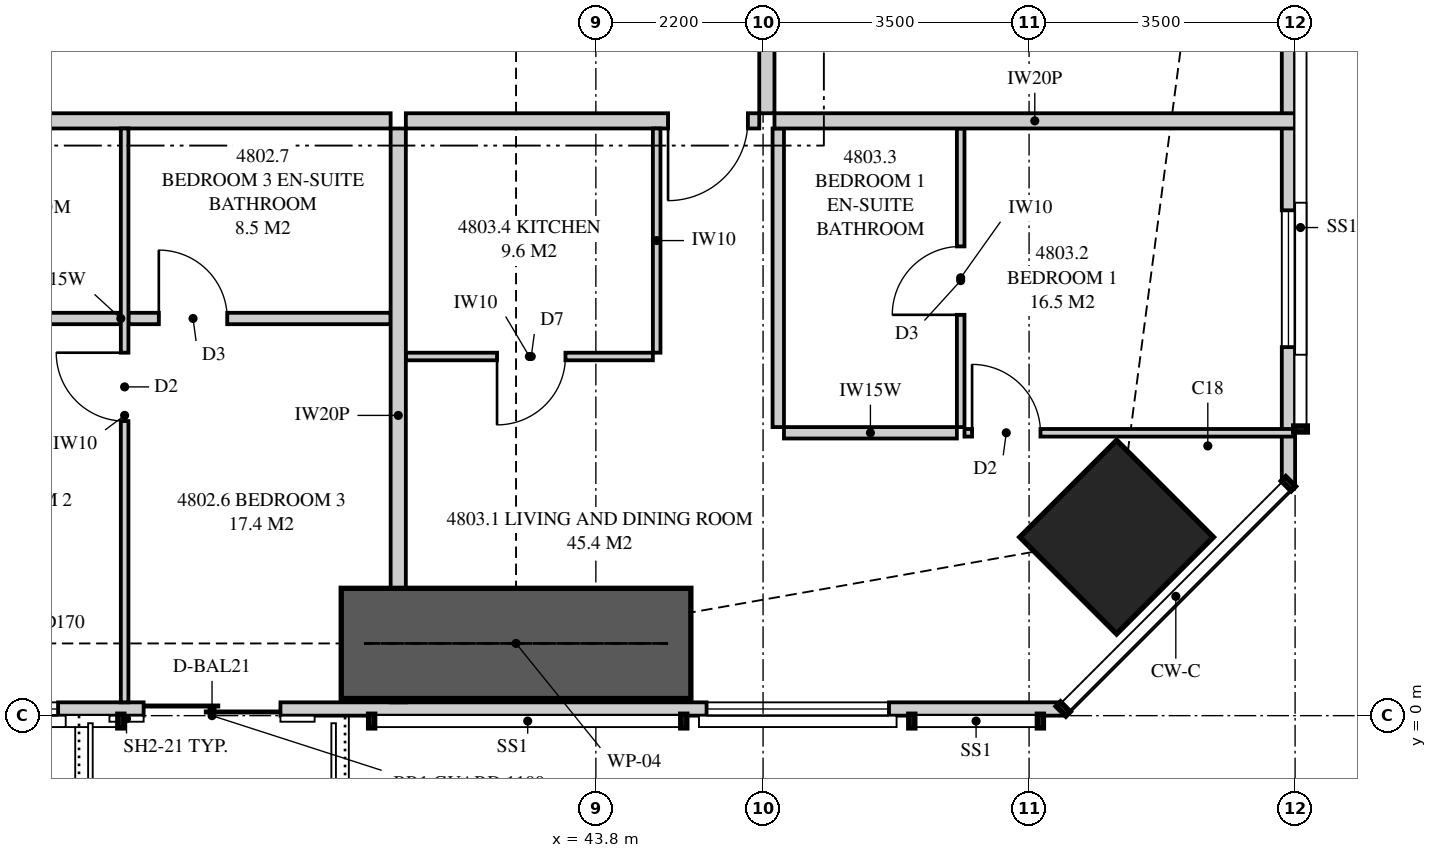
"""IFC4 building model, lengths in metres.
Left out: names, types, materials, properties, quantities, classifications, styles, units other than length and angle.
Written with IfcOpenShell. Run it as: python <this file> out.ifc"""

import sys

from ifc_helpers import new_model, si_unit, direction, frame, frame_2d, origin, origin_2d, place, context, subcontext, project, spatial, polyline, rectangle, outline, extrude, element, fill, save


model = new_model("IFC4")
c1 = context("Model", 3, precision=1e-05, world=origin(), true_north=direction((0.0, 1.0)))
c2 = subcontext(c1, "Body", "Model", "MODEL_VIEW")
j1 = project(units=[si_unit("LENGTHUNIT", "METRE"), si_unit("PLANEANGLEUNIT", "RADIAN")], contexts=[c1])
p1 = place(None, origin())
s1 = spatial("IfcSite", under=j1, at=p1, CompositionType="ELEMENT")
p2 = place(p1, origin())
s2 = spatial("IfcBuilding", under=s1, at=p2, CompositionType="ELEMENT")
p3 = place(p2, frame((0.0, 0.0, 177.8)))
s3 = spatial("IfcBuildingStorey", under=s2, at=p3, CompositionType="ELEMENT", Elevation=177.8)
p4 = place(p3, frame((50.652, 2.348, 0.0), z_axis=(0.0, 0.0, 1.0), x_axis=(0.707106781187, 0.707106781187, 0.0)))
e1 = element("IfcColumn", 1, at=p4, inside=s3, PredefinedType="COLUMN", context=c2, shape_type="SweptSolid", body=[
    extrude(rectangle(XDim=1.8, YDim=1.8, at=origin_2d()), origin(), (0.0, 0.0, 1.0), 3.35),
])
p5 = place(p3, frame((15.051, 0.087, 0.0), z_axis=(0.0, 0.0, 1.0), x_axis=(1.0, 0.0, 0.0)))
e2 = element("IfcWall", 2, at=p5, inside=s3, PredefinedType="SOLIDWALL", context=c2, shape_type="SweptSolid", body=[
    extrude(outline(polyline([(0.0, 0.0), (34.897, 0.0), (34.897, 3.11), (27.91, 3.11), (27.91, 2.15), (27.836, 2.15), (27.836, 3.11), (27.699, 3.11), (27.699, 2.15), (7.199, 2.15), (7.199, 3.11), (7.062, 3.11), (7.062, 2.15), (6.987, 2.15), (6.987, 3.11), (0.0, 3.11), (0.0, 0.0)])), frame((0.0, 0.087, 0.0), z_axis=(0.0, -1.0, 0.0), x_axis=(1.0, 0.0, 0.0)), (0.0, 0.0, 1.0), 0.175),
])
p6 = place(p5, frame((2.31, 0.0, 0.4)))
e3 = element("IfcOpeningElement", 3, at=p6, cuts=e2, PredefinedType="OPENING", context=c2, shape_type="SweptSolid", body=[
    extrude(rectangle(XDim=2.4, YDim=1.7, at=frame_2d((1.2, 0.85))), frame((0.0, 0.097, 0.0), z_axis=(0.0, -1.0, 0.0), x_axis=(1.0, 0.0, 0.0)), (0.0, 0.0, 1.0), 0.195),
])
p7 = place(p5, frame((10.399, 0.0, 0.0)))
e4 = element("IfcOpeningElement", 4, at=p7, cuts=e2, PredefinedType="OPENING", context=c2, shape_type="SweptSolid", body=[
    extrude(rectangle(XDim=1.8, YDim=2.1, at=frame_2d((0.9, 1.05))), frame((0.0, 0.097, 0.0), z_axis=(0.0, -1.0, 0.0), x_axis=(1.0, 0.0, 0.0)), (0.0, 0.0, 1.0), 0.195),
])
p8 = place(p5, frame((12.649, 0.0, 0.4)))
e5 = element("IfcOpeningElement", 5, at=p8, cuts=e2, PredefinedType="OPENING", context=c2, shape_type="SweptSolid", body=[
    extrude(rectangle(XDim=2.4, YDim=1.7, at=frame_2d((1.2, 0.85))), frame((0.0, 0.097, 0.0), z_axis=(0.0, -1.0, 0.0), x_axis=(1.0, 0.0, 0.0)), (0.0, 0.0, 1.0), 0.195),
])
p9 = place(p5, frame((19.874, 0.0, 0.4)))
e6 = element("IfcOpeningElement", 6, at=p9, cuts=e2, PredefinedType="OPENING", context=c2, shape_type="SweptSolid", body=[
    extrude(rectangle(XDim=1.8, YDim=1.7, at=frame_2d((0.9, 0.85))), frame((0.0, 0.097, 0.0), z_axis=(0.0, -1.0, 0.0), x_axis=(1.0, 0.0, 0.0)), (0.0, 0.0, 1.0), 0.195),
])
p10 = place(p5, frame((22.799, 0.0, 0.0)))
e7 = element("IfcOpeningElement", 7, at=p10, cuts=e2, PredefinedType="OPENING", context=c2, shape_type="SweptSolid", body=[
    extrude(rectangle(XDim=1.8, YDim=2.1, at=frame_2d((0.9, 1.05))), frame((0.0, 0.097, 0.0), z_axis=(0.0, -1.0, 0.0), x_axis=(1.0, 0.0, 0.0)), (0.0, 0.0, 1.0), 0.195),
])
p11 = place(p5, frame((30.205, 0.0, 0.4)))
e8 = element("IfcOpeningElement", 8, at=p11, cuts=e2, PredefinedType="OPENING", context=c2, shape_type="SweptSolid", body=[
    extrude(rectangle(XDim=2.4, YDim=1.7, at=frame_2d((1.2, 0.85))), frame((0.0, 0.097, 0.0), z_axis=(0.0, -1.0, 0.0), x_axis=(1.0, 0.0, 0.0)), (0.0, 0.0, 1.0), 0.195),
])
p12 = place(p3, frame((52.913, 3.051, 0.0), z_axis=(0.0, 0.0, 1.0), x_axis=(0.0, 1.0, 0.0)))
e9 = element("IfcWall", 9, at=p12, inside=s3, PredefinedType="SOLIDWALL", context=c2, shape_type="SweptSolid", body=[
    extrude(outline(polyline([(0.0, 0.0), (29.897, 0.0), (29.897, 3.11), (22.167, 3.11), (22.167, 2.15), (22.074, 2.15), (22.074, 3.11), (21.949, 3.11), (21.949, 2.15), (9.949, 2.15), (9.949, 3.11), (9.847, 3.11), (9.847, 2.15), (9.706, 2.15), (9.706, 3.11), (0.0, 3.11), (0.0, 0.0)])), frame((0.0, 0.087, 0.0), z_axis=(0.0, -1.0, 0.0), x_axis=(1.0, 0.0, 0.0)), (0.0, 0.0, 1.0), 0.175),
])
p13 = place(p12, frame((1.797, 0.0, 0.4)))
e10 = element("IfcOpeningElement", 10, at=p13, cuts=e9, PredefinedType="OPENING", context=c2, shape_type="SweptSolid", body=[
    extrude(rectangle(XDim=1.8, YDim=1.7, at=frame_2d((0.9, 0.85))), frame((0.0, 0.097, 0.0), z_axis=(0.0, -1.0, 0.0), x_axis=(1.0, 0.0, 0.0)), (0.0, 0.0, 1.0), 0.195),
])
p14 = place(p12, frame((6.321, 0.0, 0.4)))
e11 = element("IfcOpeningElement", 11, at=p14, cuts=e9, PredefinedType="OPENING", context=c2, shape_type="SweptSolid", body=[
    extrude(rectangle(XDim=1.2, YDim=1.7, at=frame_2d((0.6, 0.85))), frame((0.0, 0.097, 0.0), z_axis=(0.0, -1.0, 0.0), x_axis=(1.0, 0.0, 0.0)), (0.0, 0.0, 1.0), 0.195),
])
p15 = place(p12, frame((12.424, 0.0, 0.4)))
e12 = element("IfcOpeningElement", 12, at=p15, cuts=e9, PredefinedType="OPENING", context=c2, shape_type="SweptSolid", body=[
    extrude(rectangle(XDim=1.8, YDim=1.7, at=frame_2d((0.9, 0.85))), frame((0.0, 0.097, 0.0), z_axis=(0.0, -1.0, 0.0), x_axis=(1.0, 0.0, 0.0)), (0.0, 0.0, 1.0), 0.195),
])
p16 = place(p12, frame((15.274, 0.0, 0.0)))
e13 = element("IfcOpeningElement", 13, at=p16, cuts=e9, PredefinedType="OPENING", context=c2, shape_type="SweptSolid", body=[
    extrude(rectangle(XDim=1.8, YDim=2.1, at=frame_2d((0.9, 1.05))), frame((0.0, 0.097, 0.0), z_axis=(0.0, -1.0, 0.0), x_axis=(1.0, 0.0, 0.0)), (0.0, 0.0, 1.0), 0.195),
])
p17 = place(p12, frame((17.736, 0.0, 0.4)))
e14 = element("IfcOpeningElement", 14, at=p17, cuts=e9, PredefinedType="OPENING", context=c2, shape_type="SweptSolid", body=[
    extrude(rectangle(XDim=1.8, YDim=1.7, at=frame_2d((0.9, 0.85))), frame((0.0, 0.097, 0.0), z_axis=(0.0, -1.0, 0.0), x_axis=(1.0, 0.0, 0.0)), (0.0, 0.0, 1.0), 0.195),
])
p18 = place(p12, frame((24.373, 0.0, 0.4)))
e15 = element("IfcOpeningElement", 15, at=p18, cuts=e9, PredefinedType="OPENING", context=c2, shape_type="SweptSolid", body=[
    extrude(rectangle(XDim=1.2, YDim=1.7, at=frame_2d((0.6, 0.85))), frame((0.0, 0.097, 0.0), z_axis=(0.0, -1.0, 0.0), x_axis=(1.0, 0.0, 0.0)), (0.0, 0.0, 1.0), 0.195),
])
p19 = place(p12, frame((26.861, 0.0, 0.4)))
e16 = element("IfcOpeningElement", 16, at=p19, cuts=e9, PredefinedType="OPENING", context=c2, shape_type="SweptSolid", body=[
    extrude(rectangle(XDim=2.4, YDim=1.7, at=frame_2d((1.2, 0.85))), frame((0.0, 0.097, 0.0), z_axis=(0.0, -1.0, 0.0), x_axis=(1.0, 0.0, 0.0)), (0.0, 0.0, 1.0), 0.195),
])
p20 = place(p3, frame((41.2, 0.175, 0.0), z_axis=(0.0, 0.0, 1.0), x_axis=(0.0, 1.0, 0.0)))
e17 = element("IfcWall", 17, at=p20, inside=s3, PredefinedType="PARTITIONING", context=c2, shape_type="SweptSolid", body=[
    extrude(outline(polyline([(0.529, 2.15), (0.0, 2.15), (0.0, 0.0), (0.529, 0.0), (0.529, 0.248), (1.021, 0.248), (1.021, 0.0), (7.55, 0.0), (7.55, 3.11), (1.685, 3.11), (1.685, 2.15), (1.021, 2.15), (1.021, 1.902), (0.529, 1.902), (0.529, 2.15)])), frame((0.0, 0.1, 0.0), z_axis=(0.0, -1.0, 0.0), x_axis=(1.0, 0.0, 0.0)), (0.0, 0.0, 1.0), 0.2),
])
p21 = place(p3, frame((37.6, 0.175, 0.0), z_axis=(0.0, 0.0, 1.0), x_axis=(0.0, 1.0, 0.0)))
e18 = element("IfcWall", 18, at=p21, inside=s3, PredefinedType="PARTITIONING", context=c2, shape_type="SweptSolid", body=[
    extrude(outline(polyline([(0.0, 0.0), (7.55, 0.0), (7.55, 3.11), (1.635, 3.11), (1.635, 2.15), (0.0, 2.15), (0.0, 3.11), (0.0, 0.0)])), frame((0.0, 0.05, 0.0), z_axis=(0.0, -1.0, 0.0), x_axis=(1.0, 0.0, 0.0)), (0.0, 0.0, 1.0), 0.1),
])
p22 = place(p21, frame((3.7, 0.0, 0.0)))
e19 = element("IfcOpeningElement", 19, at=p22, cuts=e18, PredefinedType="OPENING", context=c2, shape_type="SweptSolid", body=[
    extrude(rectangle(XDim=0.9, YDim=2.1, at=frame_2d((0.45, 1.05))), frame((0.0, 0.06, 0.0), z_axis=(0.0, -1.0, 0.0), x_axis=(1.0, 0.0, 0.0)), (0.0, 0.0, 1.0), 0.12),
])
p23 = place(p3, frame((34.05, 5.225, 0.0), z_axis=(0.0, 0.0, 1.0), x_axis=(1.0, 0.0, 0.0)))
e20 = element("IfcWall", 20, at=p23, inside=s3, PredefinedType="PLUMBINGWALL", context=c2, shape_type="SweptSolid", body=[
    extrude(rectangle(XDim=3.5, YDim=0.15, at=frame_2d((1.75, 0.0))), origin(), (0.0, 0.0, 1.0), 3.11),
])
p24 = place(p3, frame((37.65, 5.225, 0.0), z_axis=(0.0, 0.0, 1.0), x_axis=(1.0, 0.0, 0.0)))
e21 = element("IfcWall", 21, at=p24, inside=s3, PredefinedType="PLUMBINGWALL", context=c2, shape_type="SweptSolid", body=[
    extrude(rectangle(XDim=3.45, YDim=0.15, at=frame_2d((1.725, 0.0))), origin(), (0.0, 0.0, 1.0), 3.11),
])
p25 = place(p24, frame((0.4, 0.0, 0.0)))
e22 = element("IfcOpeningElement", 22, at=p25, cuts=e21, PredefinedType="OPENING", context=c2, shape_type="SweptSolid", body=[
    extrude(rectangle(XDim=0.9, YDim=2.1, at=frame_2d((0.45, 1.05))), frame((0.0, 0.085, 0.0), z_axis=(0.0, -1.0, 0.0), x_axis=(1.0, 0.0, 0.0)), (0.0, 0.0, 1.0), 0.17),
])
p26 = place(p3, frame((41.3, 7.825, 0.0), z_axis=(0.0, 0.0, 1.0), x_axis=(1.0, 0.0, 0.0)))
e23 = element("IfcWall", 23, at=p26, inside=s3, PredefinedType="PARTITIONING", context=c2, shape_type="SweptSolid", body=[
    extrude(outline(polyline([(0.0, 0.0), (4.65, 0.0), (4.65, 3.11), (1.787, 3.11), (1.787, 2.541), (1.113, 2.541), (1.113, 3.11), (0.0, 3.11), (0.0, 0.0)])), frame((0.0, 0.1, 0.0), z_axis=(0.0, -1.0, 0.0), x_axis=(1.0, 0.0, 0.0)), (0.0, 0.0, 1.0), 0.2),
])
p27 = place(p26, frame((3.45, 0.0, 0.0)))
e24 = element("IfcOpeningElement", 24, at=p27, cuts=e23, PredefinedType="OPENING", context=c2, shape_type="SweptSolid", body=[
    extrude(rectangle(XDim=1.05, YDim=2.2, at=frame_2d((0.525, 1.1))), frame((0.0, 0.11, 0.0), z_axis=(0.0, -1.0, 0.0), x_axis=(1.0, 0.0, 0.0)), (0.0, 0.0, 1.0), 0.22),
])
p28 = place(p3, frame((48.6, 3.796, 0.0), z_axis=(0.0, 0.0, 1.0), x_axis=(0.0, 1.0, 0.0)))
e25 = element("IfcWall", 25, at=p28, inside=s3, PredefinedType="PARTITIONING", context=c2, shape_type="SweptSolid", body=[
    extrude(rectangle(XDim=3.929, YDim=0.1, at=frame_2d((1.964, 0.0))), origin(), (0.0, 0.0, 1.0), 3.11),
])
p29 = place(p28, frame((1.477, 0.0, 0.0)))
e26 = element("IfcOpeningElement", 26, at=p29, cuts=e25, PredefinedType="OPENING", context=c2, shape_type="SweptSolid", body=[
    extrude(rectangle(XDim=0.9, YDim=2.1, at=frame_2d((0.45, 1.05))), frame((0.0, 0.06, 0.0), z_axis=(0.0, -1.0, 0.0), x_axis=(1.0, 0.0, 0.0)), (0.0, 0.0, 1.0), 0.12),
])
p30 = place(p3, frame((48.65, 3.721, 0.0), z_axis=(0.0, 0.0, 1.0), x_axis=(1.0, 0.0, 0.0)))
e27 = element("IfcWall", 27, at=p30, inside=s3, PredefinedType="PARTITIONING", context=c2, shape_type="SweptSolid", body=[
    extrude(outline(polyline([(0.0, 0.0), (4.35, 0.0), (4.35, 3.11), (3.049, 3.11), (3.049, 2.15), (1.314, 2.15), (1.314, 3.11), (0.0, 3.11), (0.0, 0.0)])), frame((0.0, 0.05, 0.0), z_axis=(0.0, -1.0, 0.0), x_axis=(1.0, 0.0, 0.0)), (0.0, 0.0, 1.0), 0.1),
])
p31 = place(p30, frame((0.1, 0.0, 0.0)))
e28 = element("IfcOpeningElement", 28, at=p31, cuts=e27, PredefinedType="OPENING", context=c2, shape_type="SweptSolid", body=[
    extrude(rectangle(XDim=0.9, YDim=2.1, at=frame_2d((0.45, 1.05))), frame((0.0, 0.06, 0.0), z_axis=(0.0, -1.0, 0.0), x_axis=(1.0, 0.0, 0.0)), (0.0, 0.0, 1.0), 0.12),
])
p32 = place(p3, frame((46.275, 3.721, 0.0), z_axis=(0.0, 0.0, 1.0), x_axis=(1.0, 0.0, 0.0)))
e29 = element("IfcWall", 29, at=p32, inside=s3, PredefinedType="PLUMBINGWALL", context=c2, shape_type="SweptSolid", body=[
    extrude(rectangle(XDim=2.275, YDim=0.15, at=frame_2d((1.138, 0.0))), origin(), (0.0, 0.0, 1.0), 3.11),
])
p33 = place(p3, frame((46.2, 3.796, 0.0), z_axis=(0.0, 0.0, 1.0), x_axis=(0.0, 1.0, 0.0)))
e30 = element("IfcWall", 30, at=p33, inside=s3, PredefinedType="PLUMBINGWALL", context=c2, shape_type="SweptSolid", body=[
    extrude(rectangle(XDim=3.929, YDim=0.15, at=frame_2d((1.964, 0.0))), origin(), (0.0, 0.0, 1.0), 3.11),
])
p34 = place(p3, frame((41.3, 4.725, 0.0), z_axis=(0.0, 0.0, 1.0), x_axis=(1.0, 0.0, 0.0)))
e31 = element("IfcWall", 31, at=p34, inside=s3, PredefinedType="PARTITIONING", context=c2, shape_type="SweptSolid", body=[
    extrude(outline(polyline([(0.0, 0.0), (3.25, 0.0), (3.25, 3.11), (1.737, 3.11), (1.737, 2.541), (1.163, 2.541), (1.163, 3.11), (0.0, 3.11), (0.0, 0.0)])), frame((0.0, 0.05, 0.0), z_axis=(0.0, -1.0, 0.0), x_axis=(1.0, 0.0, 0.0)), (0.0, 0.0, 1.0), 0.1),
])
p35 = place(p34, frame((1.2, 0.0, 0.0)))
e32 = element("IfcOpeningElement", 32, at=p35, cuts=e31, PredefinedType="OPENING", context=c2, shape_type="SweptSolid", body=[
    extrude(rectangle(XDim=0.9, YDim=2.1, at=frame_2d((0.45, 1.05))), frame((0.0, 0.06, 0.0), z_axis=(0.0, -1.0, 0.0), x_axis=(1.0, 0.0, 0.0)), (0.0, 0.0, 1.0), 0.12),
])
p36 = place(p3, frame((44.6, 4.775, 0.0), z_axis=(0.0, 0.0, 1.0), x_axis=(0.0, 1.0, 0.0)))
e33 = element("IfcWall", 33, at=p36, inside=s3, PredefinedType="PARTITIONING", context=c2, shape_type="SweptSolid", body=[
    extrude(rectangle(XDim=2.95, YDim=0.1, at=frame_2d((1.475, 0.0))), origin(), (0.0, 0.0, 1.0), 3.11),
])
p37 = place(p3, frame((46.15, 7.825, 0.0), z_axis=(0.0, 0.0, 1.0), x_axis=(1.0, 0.0, 0.0)))
e34 = element("IfcWall", 34, at=p37, inside=s3, PredefinedType="PARTITIONING", context=c2, shape_type="SweptSolid", body=[
    extrude(outline(polyline([(0.0, 0.0), (6.85, 0.0), (6.85, 3.11), (6.138, 3.11), (6.138, 2.15), (4.303, 2.15), (4.303, 3.11), (0.0, 3.11), (0.0, 0.0)])), frame((0.0, 0.1, 0.0), z_axis=(0.0, -1.0, 0.0), x_axis=(1.0, 0.0, 0.0)), (0.0, 0.0, 1.0), 0.2),
])
p38 = place(p3, frame((46.05, 7.925, 0.0), z_axis=(0.0, 0.0, 1.0), x_axis=(0.0, 1.0, 0.0)))
e35 = element("IfcWall", 35, at=p38, inside=s3, PredefinedType="PARTITIONING", context=c2, shape_type="SweptSolid", body=[
    extrude(rectangle(XDim=1.188, YDim=0.2, at=frame_2d((0.594, 0.0))), origin(), (0.0, 0.0, 1.0), 3.11),
])
p39 = place(p3, frame((33.725, 7.825, 0.0), z_axis=(0.0, 0.0, 1.0), x_axis=(1.0, 0.0, 0.0)))
e36 = element("IfcWall", 36, at=p39, inside=s3, PredefinedType="PARTITIONING", context=c2, shape_type="SweptSolid", body=[
    extrude(rectangle(XDim=7.375, YDim=0.2, at=frame_2d((3.688, 0.0))), origin(), (0.0, 0.0, 1.0), 3.11),
])
p40 = place(p3, frame((40.45, 0.95, 0.0), z_axis=(0.0, 0.0, 1.0), x_axis=(1.0, 0.0, 0.0)))
e37 = element("IfcWall", 37, at=p40, inside=s3, PredefinedType="SHEAR", context=c2, shape_type="SweptSolid", body=[
    extrude(rectangle(XDim=4.6, YDim=1.45, at=frame_2d((2.3, 0.0))), origin(), (0.0, 0.0, 1.0), 3.35),
])
p41 = place(p9, origin())
e38 = element("IfcWindow", 38, at=p41, inside=s3, PartitioningType="SINGLE_PANEL", PredefinedType="WINDOW", context=c2, shape_type="SweptSolid", body=[
    extrude(rectangle(XDim=1.8, YDim=1.7, at=frame_2d((0.9, 0.85))), frame((0.0, 0.03, 0.0), z_axis=(0.0, -1.0, 0.0), x_axis=(1.0, 0.0, 0.0)), (0.0, 0.0, 1.0), 0.06),
])
fill(e6, e38)
p42 = place(p10, origin())
e39 = element("IfcDoor", 39, at=p42, inside=s3, OperationType="SLIDING_TO_LEFT", PredefinedType="DOOR", context=c2, shape_type="SweptSolid", body=[
    extrude(rectangle(XDim=1.8, YDim=2.1, at=frame_2d((0.9, 1.05))), frame((0.0, 0.025, 0.0), z_axis=(0.0, -1.0, 0.0), x_axis=(1.0, 0.0, 0.0)), (0.0, 0.0, 1.0), 0.05),
])
fill(e7, e39)
p43 = place(p11, origin())
e40 = element("IfcWindow", 40, at=p43, inside=s3, PartitioningType="SINGLE_PANEL", PredefinedType="WINDOW", context=c2, shape_type="SweptSolid", body=[
    extrude(rectangle(XDim=2.4, YDim=1.7, at=frame_2d((1.2, 0.85))), frame((0.0, 0.03, 0.0), z_axis=(0.0, -1.0, 0.0), x_axis=(1.0, 0.0, 0.0)), (0.0, 0.0, 1.0), 0.06),
])
fill(e8, e40)
p44 = place(p13, origin())
e41 = element("IfcWindow", 41, at=p44, inside=s3, PartitioningType="SINGLE_PANEL", PredefinedType="WINDOW", context=c2, shape_type="SweptSolid", body=[
    extrude(rectangle(XDim=1.8, YDim=1.7, at=frame_2d((0.9, 0.85))), frame((0.0, 0.03, 0.0), z_axis=(0.0, -1.0, 0.0), x_axis=(1.0, 0.0, 0.0)), (0.0, 0.0, 1.0), 0.06),
])
fill(e10, e41)
p45 = place(p22, origin())
e42 = element("IfcDoor", 42, at=p45, inside=s3, OperationType="SINGLE_SWING_RIGHT", PredefinedType="DOOR", context=c2, shape_type="SweptSolid", body=[
    extrude(rectangle(XDim=0.9, YDim=2.1, at=frame_2d((0.45, 1.05))), frame((0.0, 0.025, 0.0), z_axis=(0.0, -1.0, 0.0), x_axis=(1.0, 0.0, 0.0)), (0.0, 0.0, 1.0), 0.05),
])
fill(e19, e42)
p46 = place(p25, origin())
e43 = element("IfcDoor", 43, at=p46, inside=s3, OperationType="SINGLE_SWING_LEFT", PredefinedType="DOOR", context=c2, shape_type="SweptSolid", body=[
    extrude(rectangle(XDim=0.9, YDim=2.1, at=frame_2d((0.45, 1.05))), frame((0.0, 0.025, 0.0), z_axis=(0.0, -1.0, 0.0), x_axis=(1.0, 0.0, 0.0)), (0.0, 0.0, 1.0), 0.05),
])
fill(e22, e43)
p47 = place(p27, frame((1.05, 0.0, 0.0), z_axis=(0.0, 0.0, 1.0), x_axis=(-1.0, 0.0, 0.0)))
e44 = element("IfcDoor", 44, at=p47, inside=s3, OperationType="SINGLE_SWING_RIGHT", PredefinedType="DOOR", context=c2, shape_type="SweptSolid", body=[
    extrude(rectangle(XDim=1.05, YDim=2.2, at=frame_2d((0.525, 1.1))), frame((0.0, 0.025, 0.0), z_axis=(0.0, -1.0, 0.0), x_axis=(1.0, 0.0, 0.0)), (0.0, 0.0, 1.0), 0.05),
])
fill(e24, e44)
p48 = place(p31, origin())
e45 = element("IfcDoor", 45, at=p48, inside=s3, OperationType="SINGLE_SWING_LEFT", PredefinedType="DOOR", context=c2, shape_type="SweptSolid", body=[
    extrude(rectangle(XDim=0.9, YDim=2.1, at=frame_2d((0.45, 1.05))), frame((0.0, 0.025, 0.0), z_axis=(0.0, -1.0, 0.0), x_axis=(1.0, 0.0, 0.0)), (0.0, 0.0, 1.0), 0.05),
])
fill(e28, e45)
p49 = place(p29, origin())
e46 = element("IfcDoor", 46, at=p49, inside=s3, OperationType="SINGLE_SWING_LEFT", PredefinedType="DOOR", context=c2, shape_type="SweptSolid", body=[
    extrude(rectangle(XDim=0.9, YDim=2.1, at=frame_2d((0.45, 1.05))), frame((0.0, 0.025, 0.0), z_axis=(0.0, -1.0, 0.0), x_axis=(1.0, 0.0, 0.0)), (0.0, 0.0, 1.0), 0.05),
])
fill(e26, e46)
p50 = place(p35, frame((0.9, 0.0, 0.0), z_axis=(0.0, 0.0, 1.0), x_axis=(-1.0, 0.0, 0.0)))
e47 = element("IfcDoor", 47, at=p50, inside=s3, OperationType="SINGLE_SWING_RIGHT", PredefinedType="DOOR", context=c2, shape_type="SweptSolid", body=[
    extrude(rectangle(XDim=0.9, YDim=2.1, at=frame_2d((0.45, 1.05))), frame((0.0, 0.025, 0.0), z_axis=(0.0, -1.0, 0.0), x_axis=(1.0, 0.0, 0.0)), (0.0, 0.0, 1.0), 0.05),
])
fill(e32, e47)
save(model, sys.argv[1])
